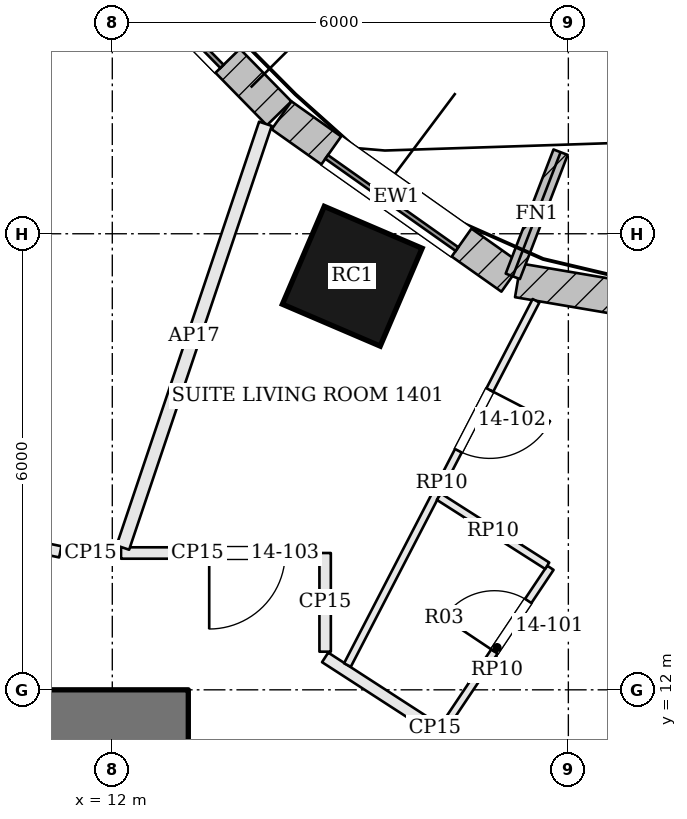
"""IFC4 building model, lengths in metres.
Left out: names, types, materials, properties, quantities, classifications, styles, units other than length and angle.
Written with IfcOpenShell. Run it as: python <this file> out.ifc"""

import sys

from ifc_helpers import new_model, si_unit, direction, frame, frame_2d, origin, origin_2d, place, context, subcontext, project, spatial, rectangle, extrude, element, fill, save


model = new_model("IFC4")
c1 = context("Model", 3, precision=1e-05, world=origin(), true_north=direction((0.0, 1.0)))
c2 = subcontext(c1, "Body", "Model", "MODEL_VIEW")
j1 = project(units=[si_unit("LENGTHUNIT", "METRE"), si_unit("PLANEANGLEUNIT", "RADIAN")], contexts=[c1])
p1 = place(None, origin())
s1 = spatial("IfcSite", under=j1, at=p1, CompositionType="ELEMENT")
p2 = place(p1, origin())
s2 = spatial("IfcBuilding", under=s1, at=p2, CompositionType="ELEMENT")
p3 = place(p2, frame((0.0, 0.0, 66.3)))
s3 = spatial("IfcBuildingStorey", under=s2, at=p3, CompositionType="ELEMENT", Elevation=66.3)
p4 = place(p3, frame((-13.0, 11.3, 0.0), z_axis=(0.0, 0.0, 1.0), x_axis=(1.0, 0.0, 0.0)))
e1 = element("IfcWall", 1, at=p4, inside=s3, PredefinedType="SHEAR", context=c2, shape_type="SweptSolid", body=[
    extrude(rectangle(XDim=26.0, YDim=1.4, at=frame_2d((13.0, 0.0))), origin(), (0.0, 0.0, 1.0), 3.6),
])
p5 = place(p4, frame((9.225, 0.0, 0.0)))
e2 = element("IfcOpeningElement", 2, at=p5, cuts=e1, PredefinedType="OPENING", context=c2, shape_type="SweptSolid", body=[
    extrude(rectangle(XDim=1.0, YDim=2.1, at=frame_2d((0.5, 1.05))), frame((0.0, 0.71, 0.0), z_axis=(0.0, -1.0, 0.0), x_axis=(1.0, 0.0, 0.0)), (0.0, 0.0, 1.0), 1.42),
])
p6 = place(p4, frame((12.225, 0.0, 0.0)))
e3 = element("IfcOpeningElement", 3, at=p6, cuts=e1, PredefinedType="OPENING", context=c2, shape_type="SweptSolid", body=[
    extrude(rectangle(XDim=0.7, YDim=2.1, at=frame_2d((0.35, 1.05))), frame((0.0, 0.71, 0.0), z_axis=(0.0, -1.0, 0.0), x_axis=(1.0, 0.0, 0.0)), (0.0, 0.0, 1.0), 1.42),
])
p7 = place(p4, frame((14.125, 0.0, 0.0)))
e4 = element("IfcOpeningElement", 4, at=p7, cuts=e1, PredefinedType="OPENING", context=c2, shape_type="SweptSolid", body=[
    extrude(rectangle(XDim=1.0, YDim=2.1, at=frame_2d((0.5, 1.05))), frame((0.0, 0.71, 0.0), z_axis=(0.0, -1.0, 0.0), x_axis=(1.0, 0.0, 0.0)), (0.0, 0.0, 1.0), 1.42),
])
p8 = place(p4, frame((15.65, 0.0, 0.0)))
e5 = element("IfcOpeningElement", 5, at=p8, cuts=e1, PredefinedType="OPENING", context=c2, shape_type="SweptSolid", body=[
    extrude(rectangle(XDim=1.0, YDim=2.1, at=frame_2d((0.5, 1.05))), frame((0.0, 0.71, 0.0), z_axis=(0.0, -1.0, 0.0), x_axis=(1.0, 0.0, 0.0)), (0.0, 0.0, 1.0), 1.42),
])
p9 = place(p3, frame((15.157, 17.441, 0.0), z_axis=(0.0, 0.0, 1.0), x_axis=(-0.919293738002, 0.393572132232, 0.0)))
e6 = element("IfcColumn", 6, at=p9, inside=s3, PredefinedType="COLUMN", context=c2, shape_type="SweptSolid", body=[
    extrude(rectangle(XDim=1.4, YDim=1.4, at=origin_2d()), origin(), (0.0, 0.0, 1.0), 3.6),
])
p10 = place(p3, frame((23.284, 16.376, 0.0), z_axis=(0.0, 0.0, 1.0), x_axis=(-0.985861729428, 0.167560885797, 0.0)))
e7 = element("IfcWall", 7, at=p10, inside=s3, PredefinedType="SOLIDWALL", context=c2, shape_type="SweptSolid", body=[
    extrude(rectangle(XDim=6.033, YDim=0.45, at=frame_2d((3.017, 0.0))), origin(), (0.0, 0.0, 1.0), 3.4),
])
p11 = place(p10, frame((1.967, 0.0, 0.9)))
e8 = element("IfcOpeningElement", 8, at=p11, cuts=e7, PredefinedType="OPENING", context=c2, shape_type="SweptSolid", body=[
    extrude(rectangle(XDim=2.1, YDim=2.0, at=frame_2d((1.05, 1.0))), frame((0.0, 0.235, 0.0), z_axis=(0.0, -1.0, 0.0), x_axis=(1.0, 0.0, 0.0)), (0.0, 0.0, 1.0), 0.47),
])
p12 = place(p3, frame((17.249, 17.422, 0.0), z_axis=(0.0, 0.0, 1.0), x_axis=(-0.816589291225, 0.577219134694, 0.0)))
e9 = element("IfcWall", 9, at=p12, inside=s3, PredefinedType="SOLIDWALL", context=c2, shape_type="SweptSolid", body=[
    extrude(rectangle(XDim=3.701, YDim=0.45, at=frame_2d((1.851, 0.0))), origin(), (0.0, 0.0, 1.0), 3.4),
])
p13 = place(p12, frame((0.801, 0.0, 0.9)))
e10 = element("IfcOpeningElement", 10, at=p13, cuts=e9, PredefinedType="OPENING", context=c2, shape_type="SweptSolid", body=[
    extrude(rectangle(XDim=2.1, YDim=2.0, at=frame_2d((1.05, 1.0))), frame((0.0, 0.235, 0.0), z_axis=(0.0, -1.0, 0.0), x_axis=(1.0, 0.0, 0.0)), (0.0, 0.0, 1.0), 0.47),
])
p14 = place(p3, frame((14.195, 19.584, 0.0), z_axis=(0.0, 0.0, 1.0), x_axis=(-0.69962350521, 0.714511687068, 0.0)))
e11 = element("IfcWall", 11, at=p14, inside=s3, PredefinedType="SOLIDWALL", context=c2, shape_type="SweptSolid", body=[
    extrude(rectangle(XDim=4.034, YDim=0.45, at=frame_2d((2.017, 0.0))), origin(), (0.0, 0.0, 1.0), 3.4),
])
p15 = place(p14, frame((0.967, 0.0, 0.9)))
e12 = element("IfcOpeningElement", 12, at=p15, cuts=e11, PredefinedType="OPENING", context=c2, shape_type="SweptSolid", body=[
    extrude(rectangle(XDim=2.1, YDim=2.0, at=frame_2d((1.05, 1.0))), frame((0.0, 0.235, 0.0), z_axis=(0.0, -1.0, 0.0), x_axis=(1.0, 0.0, 0.0)), (0.0, 0.0, 1.0), 0.47),
])
p16 = place(p3, frame((17.269, 17.44, 0.0), z_axis=(0.0, 0.0, 1.0), x_axis=(0.359381039836, 0.933190906624, 0.0)))
e13 = element("IfcWall", 13, at=p16, inside=s3, PredefinedType="SOLIDWALL", context=c2, shape_type="SweptSolid", body=[
    extrude(rectangle(XDim=1.75, YDim=0.2, at=frame_2d((0.875, 0.0))), origin(), (0.0, 0.0, 1.0), 3.4),
])
p17 = place(p3, frame((17.691, 10.556, 0.0), z_axis=(0.0, 0.0, 1.0), x_axis=(-0.839564450265, 0.54326009779, 0.0)))
e14 = element("IfcWall", 14, at=p17, inside=s3, PredefinedType="PARTITIONING", context=c2, shape_type="SweptSolid", body=[
    extrude(rectangle(XDim=3.443, YDim=0.15, at=frame_2d((1.722, 0.0))), origin(), (0.0, 0.0, 1.0), 2.68),
])
p18 = place(p3, frame((14.8, 12.502, 0.0), z_axis=(0.0, 0.0, 1.0), x_axis=(-0.000188040613, 0.99999998232, 0.0)))
e15 = element("IfcWall", 15, at=p18, inside=s3, PredefinedType="PARTITIONING", context=c2, shape_type="SweptSolid", body=[
    extrude(rectangle(XDim=1.298, YDim=0.15, at=frame_2d((0.649, 0.0))), origin(), (0.0, 0.0, 1.0), 2.68),
])
p19 = place(p3, frame((14.725, 13.8, 0.0), z_axis=(0.0, 0.0, 1.0), x_axis=(-1.0, 0.0, 0.0)))
e16 = element("IfcWall", 16, at=p19, inside=s3, PredefinedType="PARTITIONING", context=c2, shape_type="SweptSolid", body=[
    extrude(rectangle(XDim=2.61, YDim=0.15, at=frame_2d((1.305, 0.0))), origin(), (0.0, 0.0, 1.0), 2.68),
])
p20 = place(p19, frame((0.45, 0.0, 0.0)))
e17 = element("IfcOpeningElement", 17, at=p20, cuts=e16, PredefinedType="OPENING", context=c2, shape_type="SweptSolid", body=[
    extrude(rectangle(XDim=1.0, YDim=2.1, at=frame_2d((0.5, 1.05))), frame((0.0, 0.085, 0.0), z_axis=(0.0, -1.0, 0.0), x_axis=(1.0, 0.0, 0.0)), (0.0, 0.0, 1.0), 0.17),
])
p21 = place(p3, frame((14.014, 19.447, 0.0), z_axis=(0.0, 0.0, 1.0), x_axis=(-0.318853578383, -0.947803985828, 0.0)))
e18 = element("IfcWall", 18, at=p21, inside=s3, PredefinedType="PARTITIONING", context=c2, shape_type="SweptSolid", body=[
    extrude(rectangle(XDim=5.883, YDim=0.175, at=frame_2d((2.941, 0.0))), origin(), (0.0, 0.0, 1.0), 2.68),
])
p22 = place(p3, frame((12.04, 13.8, 0.0), z_axis=(0.0, 0.0, 1.0), x_axis=(-1.0, 0.0, 0.0)))
e19 = element("IfcWall", 19, at=p22, inside=s3, PredefinedType="PARTITIONING", context=c2, shape_type="SweptSolid", body=[
    extrude(rectangle(XDim=0.65, YDim=0.15, at=frame_2d((0.325, 0.0))), origin(), (0.0, 0.0, 1.0), 2.68),
])
p23 = place(p3, frame((11.316, 13.815, 0.0), z_axis=(0.0, 0.0, 1.0), x_axis=(-0.978460774853, 0.206432827025, 0.0)))
e20 = element("IfcWall", 20, at=p23, inside=s3, PredefinedType="PARTITIONING", context=c2, shape_type="SweptSolid", body=[
    extrude(rectangle(XDim=5.069, YDim=0.15, at=frame_2d((2.534, 0.0))), origin(), (0.0, 0.0, 1.0), 2.68),
])
p24 = place(p3, frame((17.575, 17.118, 0.0), z_axis=(0.0, 0.0, 1.0), x_axis=(-0.459763790059, -0.88804124755, 0.0)))
e21 = element("IfcWall", 21, at=p24, inside=s3, PredefinedType="PARTITIONING", context=c2, shape_type="SweptSolid", body=[
    extrude(rectangle(XDim=5.397, YDim=0.1, at=frame_2d((2.698, 0.0))), origin(), (0.0, 0.0, 1.0), 2.68),
])
p25 = place(p24, frame((1.322, 0.0, 0.0)))
e22 = element("IfcOpeningElement", 22, at=p25, cuts=e21, PredefinedType="OPENING", context=c2, shape_type="SweptSolid", body=[
    extrude(rectangle(XDim=0.9, YDim=2.4, at=frame_2d((0.45, 1.2))), frame((0.0, 0.06, 0.0), z_axis=(0.0, -1.0, 0.0), x_axis=(1.0, 0.0, 0.0)), (0.0, 0.0, 1.0), 0.12),
])
p26 = place(p3, frame((16.36, 11.507, 0.0), z_axis=(0.0, 0.0, 1.0), x_axis=(0.555949061639, 0.831216362245, 0.0)))
e23 = element("IfcWall", 23, at=p26, inside=s3, PredefinedType="PARTITIONING", context=c2, shape_type="SweptSolid", body=[
    extrude(rectangle(XDim=2.525, YDim=0.1, at=frame_2d((1.263, 0.0))), origin(), (0.0, 0.0, 1.0), 2.68),
])
p27 = place(p26, frame((1.2, 0.0, 0.0)))
e24 = element("IfcOpeningElement", 24, at=p27, cuts=e23, PredefinedType="OPENING", context=c2, shape_type="SweptSolid", body=[
    extrude(rectangle(XDim=0.8, YDim=2.1, at=frame_2d((0.4, 1.05))), frame((0.0, 0.06, 0.0), z_axis=(0.0, -1.0, 0.0), x_axis=(1.0, 0.0, 0.0)), (0.0, 0.0, 1.0), 0.12),
])
p28 = place(p3, frame((17.722, 13.633, 0.0), z_axis=(0.0, 0.0, 1.0), x_axis=(-0.84310195877, 0.537753742077, 0.0)))
e25 = element("IfcWall", 25, at=p28, inside=s3, PredefinedType="PARTITIONING", context=c2, shape_type="SweptSolid", body=[
    extrude(rectangle(XDim=1.69, YDim=0.1, at=frame_2d((0.845, 0.0))), origin(), (0.0, 0.0, 1.0), 2.68),
])
p29 = place(p13, origin())
e26 = element("IfcWindow", 26, at=p29, inside=s3, PartitioningType="SINGLE_PANEL", PredefinedType="WINDOW", context=c2, shape_type="SweptSolid", body=[
    extrude(rectangle(XDim=2.1, YDim=2.0, at=frame_2d((1.05, 1.0))), frame((0.0, 0.135, 0.0), z_axis=(0.0, -1.0, 0.0), x_axis=(1.0, 0.0, 0.0)), (0.0, 0.0, 1.0), 0.06),
])
fill(e10, e26)
p30 = place(p15, origin())
e27 = element("IfcWindow", 27, at=p30, inside=s3, PartitioningType="SINGLE_PANEL", PredefinedType="WINDOW", context=c2, shape_type="SweptSolid", body=[
    extrude(rectangle(XDim=2.1, YDim=2.0, at=frame_2d((1.05, 1.0))), frame((0.0, 0.135, 0.0), z_axis=(0.0, -1.0, 0.0), x_axis=(1.0, 0.0, 0.0)), (0.0, 0.0, 1.0), 0.06),
])
fill(e12, e27)
p31 = place(p27, origin())
e28 = element("IfcDoor", 28, at=p31, inside=s3, OperationType="SINGLE_SWING_LEFT", PredefinedType="DOOR", context=c2, shape_type="SweptSolid", body=[
    extrude(rectangle(XDim=0.8, YDim=2.1, at=frame_2d((0.4, 1.05))), frame((0.0, 0.025, 0.0), z_axis=(0.0, -1.0, 0.0), x_axis=(1.0, 0.0, 0.0)), (0.0, 0.0, 1.0), 0.05),
])
fill(e24, e28)
p32 = place(p25, origin())
e29 = element("IfcDoor", 29, at=p32, inside=s3, OperationType="SINGLE_SWING_LEFT", PredefinedType="DOOR", context=c2, shape_type="SweptSolid", body=[
    extrude(rectangle(XDim=0.9, YDim=2.4, at=frame_2d((0.45, 1.2))), frame((0.0, 0.025, 0.0), z_axis=(0.0, -1.0, 0.0), x_axis=(1.0, 0.0, 0.0)), (0.0, 0.0, 1.0), 0.05),
])
fill(e22, e29)
p33 = place(p20, origin())
e30 = element("IfcDoor", 30, at=p33, inside=s3, OperationType="SINGLE_SWING_RIGHT", PredefinedType="DOOR", context=c2, shape_type="SweptSolid", body=[
    extrude(rectangle(XDim=1.0, YDim=2.1, at=frame_2d((0.5, 1.05))), frame((0.0, 0.025, 0.0), z_axis=(0.0, -1.0, 0.0), x_axis=(1.0, 0.0, 0.0)), (0.0, 0.0, 1.0), 0.05),
])
fill(e17, e30)
save(model, sys.argv[1])
